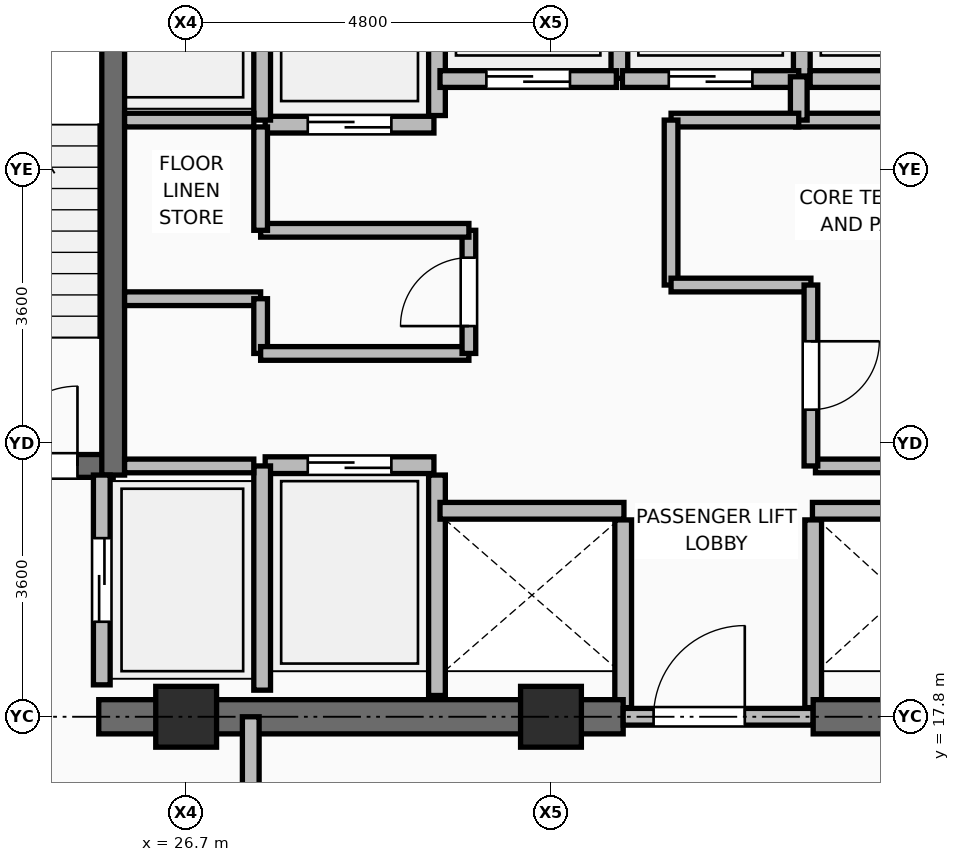
"""IFC4 building model, lengths in metres.
Left out: names, types, materials, properties, quantities, classifications, styles, units other than length and angle.
Written with IfcOpenShell. Run it as: python <this file> out.ifc"""

import sys

from ifc_helpers import new_model, si_unit, direction, frame, frame_2d, origin, origin_2d, place, context, subcontext, project, spatial, rectangle, extrude, element, fill, save


model = new_model("IFC4")
c1 = context("Model", 3, precision=1e-05, world=origin(), true_north=direction((0.0, 1.0)))
c2 = subcontext(c1, "Body", "Model", "MODEL_VIEW")
j1 = project(units=[si_unit("LENGTHUNIT", "METRE"), si_unit("PLANEANGLEUNIT", "RADIAN")], contexts=[c1])
p1 = place(None, origin())
s1 = spatial("IfcSite", under=j1, at=p1, CompositionType="ELEMENT")
p2 = place(p1, origin())
s2 = spatial("IfcBuilding", under=s1, at=p2, CompositionType="ELEMENT")
p3 = place(p2, frame((0.0, 0.0, 212.4)))
s3 = spatial("IfcBuildingStorey", under=s2, at=p3, CompositionType="ELEMENT", Elevation=212.4)
for number, where, z_axis, x_axis in (
    (1, (26.7, 17.8, 0.0), (0.0, 0.0, 1.0), (1.0, 0.0, 0.0)),
    (2, (31.5, 17.8, 0.0), (0.0, 0.0, 1.0), (1.0, 0.0, 0.0)),
):
    element("IfcColumn", number, at=place(p3, frame(where, z_axis=z_axis, x_axis=x_axis)), inside=s3, PredefinedType="COLUMN", context=c2, shape_type="SweptSolid", body=[
        extrude(rectangle(XDim=0.8, YDim=0.8, at=origin_2d()), origin(), (0.0, 0.0, 1.0), 3.75),
    ])
p4 = place(p3, frame((30.0, 18.08, 0.0), z_axis=(0.0, 0.0, 1.0), x_axis=(0.0, 1.0, 0.0)))
e3 = element("IfcWall", 3, at=p4, inside=s3, PredefinedType="PARTITIONING", context=c2, shape_type="SweptSolid", body=[
    extrude(rectangle(XDim=2.9, YDim=0.22, at=frame_2d((1.45, 0.0))), origin(), (0.0, 0.0, 1.0), 3.545),
])
for number, where, z_axis, x_axis in (
    (4, (32.45, 17.92, 0.0), (0.0, 0.0, 1.0), (0.0, 1.0, 0.0)),
    (5, (34.95, 17.92, 0.0), (0.0, 0.0, 1.0), (0.0, 1.0, 0.0)),
):
    element("IfcWall", number, at=place(p3, frame(where, z_axis=z_axis, x_axis=x_axis)), inside=s3, PredefinedType="PARTITIONING", context=c2, shape_type="SweptSolid", body=[
        extrude(rectangle(XDim=2.47, YDim=0.22, at=frame_2d((1.235, 0.0))), origin(), (0.0, 0.0, 1.0), 3.545),
    ])
p5 = place(p3, frame((30.0, 25.71, 0.0), z_axis=(0.0, 0.0, 1.0), x_axis=(0.0, 1.0, 0.0)))
e6 = element("IfcWall", 6, at=p5, inside=s3, PredefinedType="PARTITIONING", context=c2, shape_type="SweptSolid", body=[
    extrude(rectangle(XDim=2.73, YDim=0.22, at=frame_2d((1.365, 0.0))), origin(), (0.0, 0.0, 1.0), 3.545),
])
p6 = place(p3, frame((32.4, 26.2, 0.0), z_axis=(0.0, 0.0, 1.0), x_axis=(0.0, 1.0, 0.0)))
e7 = element("IfcWall", 7, at=p6, inside=s3, PredefinedType="PARTITIONING", context=c2, shape_type="SweptSolid", body=[
    extrude(rectangle(XDim=2.24, YDim=0.22, at=frame_2d((1.12, 0.0))), origin(), (0.0, 0.0, 1.0), 3.545),
])
p7 = place(p3, frame((34.8, 26.23, 0.0), z_axis=(0.0, 0.0, 1.0), x_axis=(0.0, 1.0, 0.0)))
e8 = element("IfcWall", 8, at=p7, inside=s3, PredefinedType="PARTITIONING", context=c2, shape_type="SweptSolid", body=[
    extrude(rectangle(XDim=2.21, YDim=0.22, at=frame_2d((1.105, 0.0))), origin(), (0.0, 0.0, 1.0), 3.545),
])
p8 = place(p3, frame((34.91, 26.19, 0.0), z_axis=(0.0, 0.0, 1.0), x_axis=(1.0, 0.0, 0.0)))
e9 = element("IfcWall", 9, at=p8, inside=s3, PredefinedType="PARTITIONING", context=c2, shape_type="SweptSolid", body=[
    extrude(rectangle(XDim=2.14, YDim=0.22, at=frame_2d((1.07, 0.0))), origin(), (0.0, 0.0, 1.0), 3.545),
])
p9 = place(p3, frame((25.55, 17.8, 0.0), z_axis=(0.0, 0.0, 1.0), x_axis=(1.0, 0.0, 0.0)))
e10 = element("IfcWall", 10, at=p9, inside=s3, PredefinedType="SHEAR", context=c2, shape_type="SweptSolid", body=[
    extrude(rectangle(XDim=6.9, YDim=0.45, at=frame_2d((3.45, 0.0))), origin(), (0.0, 0.0, 1.0), 3.57),
])
p10 = place(p3, frame((32.45, 17.8, 0.0), z_axis=(0.0, 0.0, 1.0), x_axis=(1.0, 0.0, 0.0)))
e11 = element("IfcWall", 11, at=p10, inside=s3, PredefinedType="PARTITIONING", context=c2, shape_type="SweptSolid", body=[
    extrude(rectangle(XDim=2.5, YDim=0.22, at=frame_2d((1.25, 0.0))), origin(), (0.0, 0.0, 1.0), 3.081),
])
p11 = place(p10, frame((0.4, 0.0, 0.0)))
e12 = element("IfcOpeningElement", 12, at=p11, cuts=e11, PredefinedType="OPENING", context=c2, shape_type="SweptSolid", body=[
    extrude(rectangle(XDim=1.2, YDim=2.1, at=frame_2d((0.6, 1.05))), frame((0.0, 0.12, 0.0), z_axis=(0.0, -1.0, 0.0), x_axis=(1.0, 0.0, 0.0)), (0.0, 0.0, 1.0), 0.24),
])
p12 = place(p3, frame((34.95, 17.8, 0.0), z_axis=(0.0, 0.0, 1.0), x_axis=(1.0, 0.0, 0.0)))
e13 = element("IfcWall", 13, at=p12, inside=s3, PredefinedType="SHEAR", context=c2, shape_type="SweptSolid", body=[
    extrude(rectangle(XDim=6.375, YDim=0.45, at=frame_2d((3.188, 0.0))), origin(), (0.0, 0.0, 1.0), 3.57),
])
p13 = place(p3, frame((22.125, 21.1, 0.0), z_axis=(0.0, 0.0, 1.0), x_axis=(1.0, 0.0, 0.0)))
e14 = element("IfcWall", 14, at=p13, inside=s3, PredefinedType="SHEAR", context=c2, shape_type="SweptSolid", body=[
    extrude(rectangle(XDim=3.615, YDim=0.3, at=frame_2d((1.808, 0.0))), origin(), (0.0, 0.0, 1.0), 3.57),
])
p14 = place(p13, frame((2.095, 0.0, 0.0)))
e15 = element("IfcOpeningElement", 15, at=p14, cuts=e14, PredefinedType="OPENING", context=c2, shape_type="SweptSolid", body=[
    extrude(rectangle(XDim=1.05, YDim=2.1, at=frame_2d((0.525, 1.05))), frame((0.0, 0.16, 0.0), z_axis=(0.0, -1.0, 0.0), x_axis=(1.0, 0.0, 0.0)), (0.0, 0.0, 1.0), 0.32),
])
p15 = place(p3, frame((25.74, 20.98, 0.0), z_axis=(0.0, 0.0, 1.0), x_axis=(0.0, 1.0, 0.0)))
e16 = element("IfcWall", 16, at=p15, inside=s3, PredefinedType="SHEAR", context=c2, shape_type="SweptSolid", body=[
    extrude(rectangle(XDim=7.99, YDim=0.3, at=frame_2d((3.995, 0.0))), origin(), (0.0, 0.0, 1.0), 3.57),
])
p16 = place(p3, frame((25.59, 18.22, 0.0), z_axis=(0.0, 0.0, 1.0), x_axis=(0.0, 1.0, 0.0)))
e17 = element("IfcWall", 17, at=p16, inside=s3, PredefinedType="PARTITIONING", context=c2, shape_type="SweptSolid", body=[
    extrude(rectangle(XDim=2.76, YDim=0.22, at=frame_2d((1.38, 0.0))), origin(), (0.0, 0.0, 1.0), 3.55),
])
p17 = place(p16, frame((0.83, 0.0, 0.0)))
e18 = element("IfcOpeningElement", 18, at=p17, cuts=e17, PredefinedType="OPENING", context=c2, shape_type="SweptSolid", body=[
    extrude(rectangle(XDim=1.1, YDim=2.2, at=frame_2d((0.55, 1.1))), frame((0.0, 0.12, 0.0), z_axis=(0.0, -1.0, 0.0), x_axis=(1.0, 0.0, 0.0)), (0.0, 0.0, 1.0), 0.24),
])
p18 = place(p3, frame((27.74, 21.11, 0.0), z_axis=(0.0, 0.0, 1.0), x_axis=(1.0, 0.0, 0.0)))
e19 = element("IfcWall", 19, at=p18, inside=s3, PredefinedType="PARTITIONING", context=c2, shape_type="SweptSolid", body=[
    extrude(rectangle(XDim=2.22, YDim=0.22, at=frame_2d((1.11, 0.0))), origin(), (0.0, 0.0, 1.0), 3.55),
])
p19 = place(p18, frame((0.56, 0.0, 0.0)))
e20 = element("IfcOpeningElement", 20, at=p19, cuts=e19, PredefinedType="OPENING", context=c2, shape_type="SweptSolid", body=[
    extrude(rectangle(XDim=1.1, YDim=2.2, at=frame_2d((0.55, 1.1))), frame((0.0, 0.12, 0.0), z_axis=(0.0, -1.0, 0.0), x_axis=(1.0, 0.0, 0.0)), (0.0, 0.0, 1.0), 0.24),
])
p20 = place(p3, frame((27.74, 25.59, 0.0), z_axis=(0.0, 0.0, 1.0), x_axis=(1.0, 0.0, 0.0)))
e21 = element("IfcWall", 21, at=p20, inside=s3, PredefinedType="PARTITIONING", context=c2, shape_type="SweptSolid", body=[
    extrude(rectangle(XDim=2.22, YDim=0.22, at=frame_2d((1.11, 0.0))), origin(), (0.0, 0.0, 1.0), 3.55),
])
p21 = place(p20, frame((0.56, 0.0, 0.0)))
e22 = element("IfcOpeningElement", 22, at=p21, cuts=e21, PredefinedType="OPENING", context=c2, shape_type="SweptSolid", body=[
    extrude(rectangle(XDim=1.1, YDim=2.2, at=frame_2d((0.55, 1.1))), frame((0.0, 0.12, 0.0), z_axis=(0.0, -1.0, 0.0), x_axis=(1.0, 0.0, 0.0)), (0.0, 0.0, 1.0), 0.24),
])
p22 = place(p3, frame((30.04, 20.51, 0.0), z_axis=(0.0, 0.0, 1.0), x_axis=(1.0, 0.0, 0.0)))
e23 = element("IfcWall", 23, at=p22, inside=s3, PredefinedType="PARTITIONING", context=c2, shape_type="SweptSolid", body=[
    extrude(rectangle(XDim=2.42, YDim=0.22, at=frame_2d((1.21, 0.0))), origin(), (0.0, 0.0, 1.0), 3.55),
])
p23 = place(p3, frame((34.94, 20.51, 0.0), z_axis=(0.0, 0.0, 1.0), x_axis=(1.0, 0.0, 0.0)))
e24 = element("IfcWall", 24, at=p23, inside=s3, PredefinedType="PARTITIONING", context=c2, shape_type="SweptSolid", body=[
    extrude(rectangle(XDim=2.24, YDim=0.22, at=frame_2d((1.12, 0.0))), origin(), (0.0, 0.0, 1.0), 3.55),
])
p24 = place(p3, frame((30.04, 26.19, 0.0), z_axis=(0.0, 0.0, 1.0), x_axis=(1.0, 0.0, 0.0)))
e25 = element("IfcWall", 25, at=p24, inside=s3, PredefinedType="PARTITIONING", context=c2, shape_type="SweptSolid", body=[
    extrude(rectangle(XDim=2.32, YDim=0.22, at=frame_2d((1.16, 0.0))), origin(), (0.0, 0.0, 1.0), 3.55),
])
p25 = place(p24, frame((0.61, 0.0, 0.0)))
e26 = element("IfcOpeningElement", 26, at=p25, cuts=e25, PredefinedType="OPENING", context=c2, shape_type="SweptSolid", body=[
    extrude(rectangle(XDim=1.1, YDim=2.2, at=frame_2d((0.55, 1.1))), frame((0.0, 0.12, 0.0), z_axis=(0.0, -1.0, 0.0), x_axis=(1.0, 0.0, 0.0)), (0.0, 0.0, 1.0), 0.24),
])
p26 = place(p3, frame((32.44, 26.19, 0.0), z_axis=(0.0, 0.0, 1.0), x_axis=(1.0, 0.0, 0.0)))
e27 = element("IfcWall", 27, at=p26, inside=s3, PredefinedType="PARTITIONING", context=c2, shape_type="SweptSolid", body=[
    extrude(rectangle(XDim=2.32, YDim=0.22, at=frame_2d((1.16, 0.0))), origin(), (0.0, 0.0, 1.0), 3.55),
])
p27 = place(p26, frame((0.61, 0.0, 0.0)))
e28 = element("IfcOpeningElement", 28, at=p27, cuts=e27, PredefinedType="OPENING", context=c2, shape_type="SweptSolid", body=[
    extrude(rectangle(XDim=1.1, YDim=2.2, at=frame_2d((0.55, 1.1))), frame((0.0, 0.12, 0.0), z_axis=(0.0, -1.0, 0.0), x_axis=(1.0, 0.0, 0.0)), (0.0, 0.0, 1.0), 0.24),
])
p28 = place(p3, frame((27.7, 18.15, 0.0), z_axis=(0.0, 0.0, 1.0), x_axis=(0.0, 1.0, 0.0)))
e29 = element("IfcWall", 29, at=p28, inside=s3, PredefinedType="PARTITIONING", context=c2, shape_type="SweptSolid", body=[
    extrude(rectangle(XDim=2.95, YDim=0.22, at=frame_2d((1.475, 0.0))), origin(), (0.0, 0.0, 1.0), 3.55),
])
p29 = place(p3, frame((27.7, 25.65, 0.0), z_axis=(0.0, 0.0, 1.0), x_axis=(0.0, 1.0, 0.0)))
e30 = element("IfcWall", 30, at=p29, inside=s3, PredefinedType="PARTITIONING", context=c2, shape_type="SweptSolid", body=[
    extrude(rectangle(XDim=3.0, YDim=0.22, at=frame_2d((1.5, 0.0))), origin(), (0.0, 0.0, 1.0), 3.55),
])
for number, where, z_axis, x_axis in (
    (31, (25.89, 21.1, 0.0), (0.0, 0.0, 1.0), (1.0, 0.0, 0.0)),
    (32, (25.89, 25.65, 0.0), (0.0, 0.0, 1.0), (1.0, 0.0, 0.0)),
):
    element("IfcWall", number, at=place(p3, frame(where, z_axis=z_axis, x_axis=x_axis)), inside=s3, PredefinedType="PARTITIONING", context=c2, shape_type="SweptSolid", body=[
        extrude(rectangle(XDim=1.7, YDim=0.18, at=frame_2d((0.85, 0.0))), origin(), (0.0, 0.0, 1.0), 3.55),
    ])
p30 = place(p3, frame((25.89, 23.3, 0.0), z_axis=(0.0, 0.0, 1.0), x_axis=(1.0, 0.0, 0.0)))
e33 = element("IfcWall", 33, at=p30, inside=s3, PredefinedType="PARTITIONING", context=c2, shape_type="SweptSolid", body=[
    extrude(rectangle(XDim=1.79, YDim=0.18, at=frame_2d((0.895, 0.0))), origin(), (0.0, 0.0, 1.0), 3.55),
])
p31 = place(p3, frame((27.68, 22.58, 0.0), z_axis=(0.0, 0.0, 1.0), x_axis=(0.0, 1.0, 0.0)))
e34 = element("IfcWall", 34, at=p31, inside=s3, PredefinedType="PARTITIONING", context=c2, shape_type="SweptSolid", body=[
    extrude(rectangle(XDim=0.72, YDim=0.18, at=frame_2d((0.36, 0.0))), origin(), (0.0, 0.0, 1.0), 3.55),
])
p32 = place(p3, frame((27.68, 22.58, 0.0), z_axis=(0.0, 0.0, 1.0), x_axis=(1.0, 0.0, 0.0)))
e35 = element("IfcWall", 35, at=p32, inside=s3, PredefinedType="PARTITIONING", context=c2, shape_type="SweptSolid", body=[
    extrude(rectangle(XDim=2.74, YDim=0.18, at=frame_2d((1.37, 0.0))), origin(), (0.0, 0.0, 1.0), 3.55),
])
p33 = place(p3, frame((30.42, 22.58, 0.0), z_axis=(0.0, 0.0, 1.0), x_axis=(0.0, 1.0, 0.0)))
e36 = element("IfcWall", 36, at=p33, inside=s3, PredefinedType="PARTITIONING", context=c2, shape_type="SweptSolid", body=[
    extrude(rectangle(XDim=1.62, YDim=0.18, at=frame_2d((0.81, 0.0))), origin(), (0.0, 0.0, 1.0), 3.55),
])
p34 = place(p33, frame((0.36, 0.0, 0.0)))
e37 = element("IfcOpeningElement", 37, at=p34, cuts=e36, PredefinedType="OPENING", context=c2, shape_type="SweptSolid", body=[
    extrude(rectangle(XDim=0.9, YDim=2.1, at=frame_2d((0.45, 1.05))), frame((0.0, 0.1, 0.0), z_axis=(0.0, -1.0, 0.0), x_axis=(1.0, 0.0, 0.0)), (0.0, 0.0, 1.0), 0.2),
])
p35 = place(p3, frame((27.68, 24.2, 0.0), z_axis=(0.0, 0.0, 1.0), x_axis=(1.0, 0.0, 0.0)))
e38 = element("IfcWall", 38, at=p35, inside=s3, PredefinedType="PARTITIONING", context=c2, shape_type="SweptSolid", body=[
    extrude(rectangle(XDim=2.74, YDim=0.18, at=frame_2d((1.37, 0.0))), origin(), (0.0, 0.0, 1.0), 3.55),
])
p36 = place(p3, frame((27.68, 24.2, 0.0), z_axis=(0.0, 0.0, 1.0), x_axis=(0.0, 1.0, 0.0)))
e39 = element("IfcWall", 39, at=p36, inside=s3, PredefinedType="PARTITIONING", context=c2, shape_type="SweptSolid", body=[
    extrude(rectangle(XDim=1.36, YDim=0.18, at=frame_2d((0.68, 0.0))), origin(), (0.0, 0.0, 1.0), 3.55),
])
p37 = place(p3, frame((34.98, 21.1, 0.0), z_axis=(0.0, 0.0, 1.0), x_axis=(1.0, 0.0, 0.0)))
e40 = element("IfcWall", 40, at=p37, inside=s3, PredefinedType="PARTITIONING", context=c2, shape_type="SweptSolid", body=[
    extrude(rectangle(XDim=2.08, YDim=0.18, at=frame_2d((1.04, 0.0))), origin(), (0.0, 0.0, 1.0), 3.55),
])
p38 = place(p3, frame((34.72, 25.65, 0.0), z_axis=(0.0, 0.0, 1.0), x_axis=(1.0, 0.0, 0.0)))
e41 = element("IfcWall", 41, at=p38, inside=s3, PredefinedType="PARTITIONING", context=c2, shape_type="SweptSolid", body=[
    extrude(rectangle(XDim=2.34, YDim=0.18, at=frame_2d((1.17, 0.0))), origin(), (0.0, 0.0, 1.0), 3.55),
])
p39 = place(p3, frame((34.76, 25.65, 0.0), z_axis=(0.0, 0.0, 1.0), x_axis=(0.0, 1.0, 0.0)))
e42 = element("IfcWall", 42, at=p39, inside=s3, PredefinedType="PARTITIONING", context=c2, shape_type="SweptSolid", body=[
    extrude(rectangle(XDim=0.57, YDim=0.22, at=frame_2d((0.285, 0.0))), origin(), (0.0, 0.0, 1.0), 3.55),
])
p40 = place(p3, frame((33.08, 25.65, 0.0), z_axis=(0.0, 0.0, 1.0), x_axis=(1.0, 0.0, 0.0)))
e43 = element("IfcWall", 43, at=p40, inside=s3, PredefinedType="PARTITIONING", context=c2, shape_type="SweptSolid", body=[
    extrude(rectangle(XDim=1.68, YDim=0.18, at=frame_2d((0.84, 0.0))), origin(), (0.0, 0.0, 1.0), 3.55),
])
p41 = place(p3, frame((33.08, 23.48, 0.0), z_axis=(0.0, 0.0, 1.0), x_axis=(0.0, 1.0, 0.0)))
e44 = element("IfcWall", 44, at=p41, inside=s3, PredefinedType="PARTITIONING", context=c2, shape_type="SweptSolid", body=[
    extrude(rectangle(XDim=2.17, YDim=0.18, at=frame_2d((1.085, 0.0))), origin(), (0.0, 0.0, 1.0), 3.55),
])
p42 = place(p3, frame((33.08, 23.48, 0.0), z_axis=(0.0, 0.0, 1.0), x_axis=(1.0, 0.0, 0.0)))
e45 = element("IfcWall", 45, at=p42, inside=s3, PredefinedType="PARTITIONING", context=c2, shape_type="SweptSolid", body=[
    extrude(rectangle(XDim=1.84, YDim=0.18, at=frame_2d((0.92, 0.0))), origin(), (0.0, 0.0, 1.0), 3.55),
])
p43 = place(p3, frame((34.92, 21.1, 0.0), z_axis=(0.0, 0.0, 1.0), x_axis=(0.0, 1.0, 0.0)))
e46 = element("IfcWall", 46, at=p43, inside=s3, PredefinedType="PARTITIONING", context=c2, shape_type="SweptSolid", body=[
    extrude(rectangle(XDim=2.38, YDim=0.18, at=frame_2d((1.19, 0.0))), origin(), (0.0, 0.0, 1.0), 3.55),
])
p44 = place(p43, frame((0.74, 0.0, 0.0)))
e47 = element("IfcOpeningElement", 47, at=p44, cuts=e46, PredefinedType="OPENING", context=c2, shape_type="SweptSolid", body=[
    extrude(rectangle(XDim=0.9, YDim=2.1, at=frame_2d((0.45, 1.05))), frame((0.0, 0.1, 0.0), z_axis=(0.0, -1.0, 0.0), x_axis=(1.0, 0.0, 0.0)), (0.0, 0.0, 1.0), 0.2),
])
p45 = place(p3, frame((27.55, 14.35, 0.0), z_axis=(0.0, 0.0, 1.0), x_axis=(0.0, 1.0, 0.0)))
e48 = element("IfcWall", 48, at=p45, inside=s3, PredefinedType="PARTITIONING", context=c2, shape_type="SweptSolid", body=[
    extrude(rectangle(XDim=3.45, YDim=0.22, at=frame_2d((1.725, 0.0))), origin(), (0.0, 0.0, 1.0), 3.081),
])
p46 = place(p45, frame((1.175, 0.0, 0.0)))
e49 = element("IfcOpeningElement", 49, at=p46, cuts=e48, PredefinedType="OPENING", context=c2, shape_type="SweptSolid", body=[
    extrude(rectangle(XDim=1.1, YDim=2.1, at=frame_2d((0.55, 1.05))), frame((0.0, 0.12, 0.0), z_axis=(0.0, -1.0, 0.0), x_axis=(1.0, 0.0, 0.0)), (0.0, 0.0, 1.0), 0.24),
])
p47 = place(p11, origin())
e50 = element("IfcDoor", 50, at=p47, inside=s3, OperationType="SINGLE_SWING_RIGHT", PredefinedType="DOOR", context=c2, shape_type="SweptSolid", body=[
    extrude(rectangle(XDim=1.2, YDim=2.1, at=frame_2d((0.6, 1.05))), frame((0.0, 0.025, 0.0), z_axis=(0.0, -1.0, 0.0), x_axis=(1.0, 0.0, 0.0)), (0.0, 0.0, 1.0), 0.05),
])
fill(e12, e50)
p48 = place(p14, origin())
e51 = element("IfcDoor", 51, at=p48, inside=s3, OperationType="SINGLE_SWING_RIGHT", PredefinedType="DOOR", context=c2, shape_type="SweptSolid", body=[
    extrude(rectangle(XDim=1.05, YDim=2.1, at=frame_2d((0.525, 1.05))), frame((0.0, 0.025, 0.0), z_axis=(0.0, -1.0, 0.0), x_axis=(1.0, 0.0, 0.0)), (0.0, 0.0, 1.0), 0.05),
])
fill(e15, e51)
p49 = place(p17, origin())
e52 = element("IfcDoor", 52, at=p49, inside=s3, OperationType="DOUBLE_DOOR_SLIDING", PredefinedType="DOOR", context=c2, shape_type="SweptSolid", body=[
    extrude(rectangle(XDim=1.1, YDim=2.2, at=frame_2d((0.55, 1.1))), frame((0.0, 0.025, 0.0), z_axis=(0.0, -1.0, 0.0), x_axis=(1.0, 0.0, 0.0)), (0.0, 0.0, 1.0), 0.05),
])
fill(e18, e52)
p50 = place(p19, origin())
e53 = element("IfcDoor", 53, at=p50, inside=s3, OperationType="DOUBLE_DOOR_SLIDING", PredefinedType="DOOR", context=c2, shape_type="SweptSolid", body=[
    extrude(rectangle(XDim=1.1, YDim=2.2, at=frame_2d((0.55, 1.1))), frame((0.0, 0.025, 0.0), z_axis=(0.0, -1.0, 0.0), x_axis=(1.0, 0.0, 0.0)), (0.0, 0.0, 1.0), 0.05),
])
fill(e20, e53)
p51 = place(p21, frame((1.1, 0.0, 0.0), z_axis=(0.0, 0.0, 1.0), x_axis=(-1.0, 0.0, 0.0)))
e54 = element("IfcDoor", 54, at=p51, inside=s3, OperationType="DOUBLE_DOOR_SLIDING", PredefinedType="DOOR", context=c2, shape_type="SweptSolid", body=[
    extrude(rectangle(XDim=1.1, YDim=2.2, at=frame_2d((0.55, 1.1))), frame((0.0, 0.025, 0.0), z_axis=(0.0, -1.0, 0.0), x_axis=(1.0, 0.0, 0.0)), (0.0, 0.0, 1.0), 0.05),
])
fill(e22, e54)
p52 = place(p25, frame((1.1, 0.0, 0.0), z_axis=(0.0, 0.0, 1.0), x_axis=(-1.0, 0.0, 0.0)))
e55 = element("IfcDoor", 55, at=p52, inside=s3, OperationType="DOUBLE_DOOR_SLIDING", PredefinedType="DOOR", context=c2, shape_type="SweptSolid", body=[
    extrude(rectangle(XDim=1.1, YDim=2.2, at=frame_2d((0.55, 1.1))), frame((0.0, 0.025, 0.0), z_axis=(0.0, -1.0, 0.0), x_axis=(1.0, 0.0, 0.0)), (0.0, 0.0, 1.0), 0.05),
])
fill(e26, e55)
p53 = place(p27, frame((1.1, 0.0, 0.0), z_axis=(0.0, 0.0, 1.0), x_axis=(-1.0, 0.0, 0.0)))
e56 = element("IfcDoor", 56, at=p53, inside=s3, OperationType="DOUBLE_DOOR_SLIDING", PredefinedType="DOOR", context=c2, shape_type="SweptSolid", body=[
    extrude(rectangle(XDim=1.1, YDim=2.2, at=frame_2d((0.55, 1.1))), frame((0.0, 0.025, 0.0), z_axis=(0.0, -1.0, 0.0), x_axis=(1.0, 0.0, 0.0)), (0.0, 0.0, 1.0), 0.05),
])
fill(e28, e56)
p54 = place(p34, origin())
e57 = element("IfcDoor", 57, at=p54, inside=s3, OperationType="SINGLE_SWING_LEFT", PredefinedType="DOOR", context=c2, shape_type="SweptSolid", body=[
    extrude(rectangle(XDim=0.9, YDim=2.1, at=frame_2d((0.45, 1.05))), frame((0.0, 0.025, 0.0), z_axis=(0.0, -1.0, 0.0), x_axis=(1.0, 0.0, 0.0)), (0.0, 0.0, 1.0), 0.05),
])
fill(e37, e57)
p55 = place(p44, frame((0.9, 0.0, 0.0), z_axis=(0.0, 0.0, 1.0), x_axis=(-1.0, 0.0, 0.0)))
e58 = element("IfcDoor", 58, at=p55, inside=s3, OperationType="SINGLE_SWING_LEFT", PredefinedType="DOOR", context=c2, shape_type="SweptSolid", body=[
    extrude(rectangle(XDim=0.9, YDim=2.1, at=frame_2d((0.45, 1.05))), frame((0.0, 0.025, 0.0), z_axis=(0.0, -1.0, 0.0), x_axis=(1.0, 0.0, 0.0)), (0.0, 0.0, 1.0), 0.05),
])
fill(e47, e58)
save(model, sys.argv[1])
